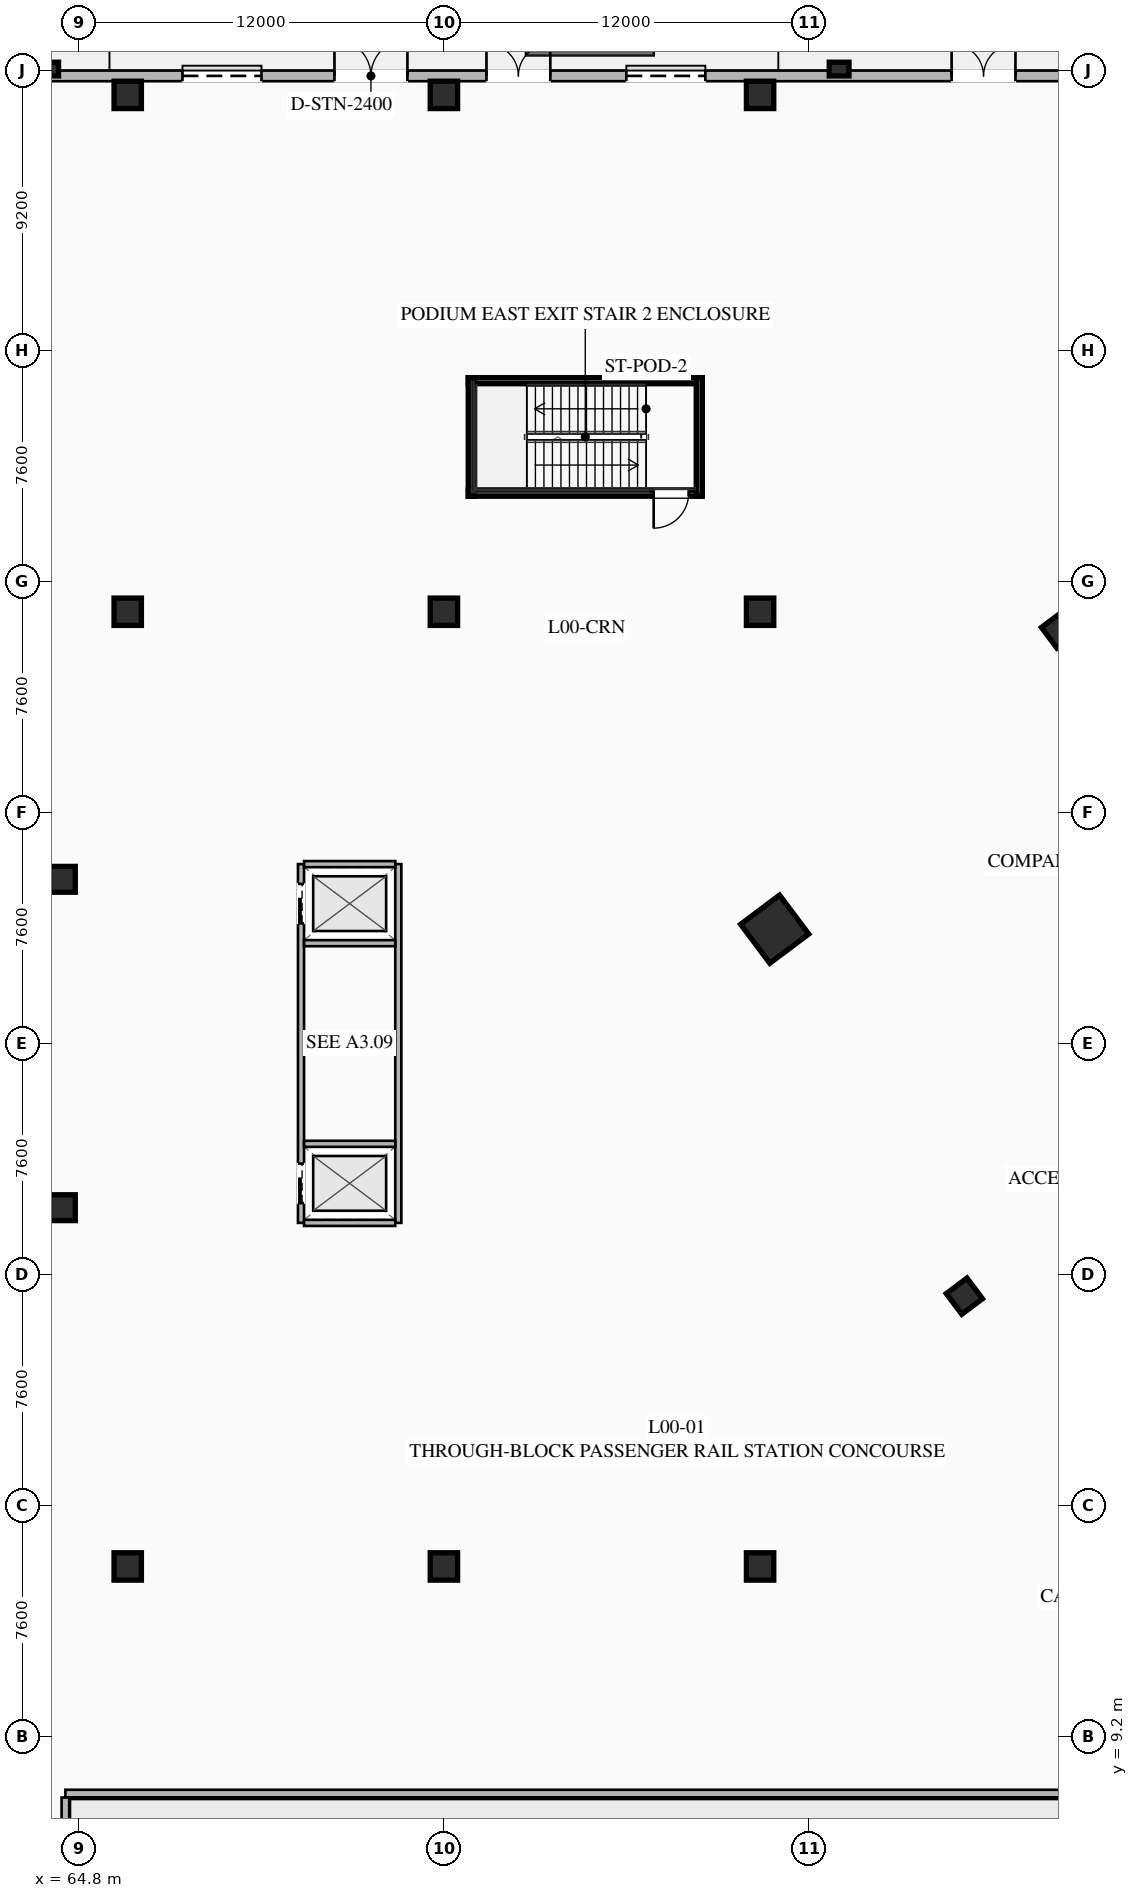
"""IFC4 building model, lengths in metres.
Left out: names, types, materials, properties, quantities, classifications, styles, units other than length and angle.
Written with IfcOpenShell. Run it as: python <this file> out.ifc"""

import sys

from ifc_helpers import new_model, si_unit, direction, frame, frame_2d, origin, origin_2d, place, context, subcontext, project, spatial, rectangle, hollow_rectangle, extrude, element, fill, save


model = new_model("IFC4")
c1 = context("Model", 3, precision=1e-05, world=origin(), true_north=direction((0.0, 1.0)))
c2 = subcontext(c1, "Body", "Model", "MODEL_VIEW")
j1 = project(units=[si_unit("LENGTHUNIT", "METRE"), si_unit("PLANEANGLEUNIT", "RADIAN")], contexts=[c1])
p1 = place(None, origin())
s1 = spatial("IfcSite", under=j1, at=p1, CompositionType="ELEMENT")
p2 = place(p1, origin())
s2 = spatial("IfcBuilding", under=s1, at=p2, CompositionType="ELEMENT")
p3 = place(p2, origin())
s3 = spatial("IfcBuildingStorey", under=s2, at=p3, CompositionType="ELEMENT", Elevation=0.0)
for number, where, z_axis, x_axis in (
    (1, (64.25, 26.6, 0.0), (0.0, 0.0, 1.0), (1.0, 0.0, 0.0)),
    (2, (64.25, 37.4, 0.0), (0.0, 0.0, 1.0), (1.0, 0.0, 0.0)),
):
    element("IfcColumn", number, at=place(p3, frame(where, z_axis=z_axis, x_axis=x_axis)), inside=s3, PredefinedType="COLUMN", context=c2, shape_type="SweptSolid", body=[
        extrude(hollow_rectangle(XDim=0.85, YDim=0.85, WallThickness=0.035, at=origin_2d()), origin(), (0.0, 0.0, 1.0), 5.14),
    ])
p4 = place(p3, frame((87.68, 35.76, 0.0), z_axis=(0.0, 0.0, 1.0), x_axis=(0.799999996291, 0.600000004945, 0.0)))
e3 = element("IfcColumn", 3, at=p4, inside=s3, PredefinedType="COLUMN", context=c2, shape_type="SweptSolid", body=[
    extrude(hollow_rectangle(XDim=1.6, YDim=1.6, WallThickness=0.06, at=origin_2d()), origin(), (0.0, 0.0, 1.0), 5.14),
])
for number, where, z_axis, x_axis in (
    (4, (97.05, 45.6, 0.0), (0.0, 0.0, 1.0), (0.8, 0.6, 0.0)),
    (5, (93.92, 23.69, 0.0), (0.0, 0.0, 1.0), (0.8, 0.6, 0.0)),
):
    element("IfcColumn", number, at=place(p3, frame(where, z_axis=z_axis, x_axis=x_axis)), inside=s3, PredefinedType="COLUMN", context=c2, shape_type="SweptSolid", body=[
        extrude(hollow_rectangle(XDim=0.85, YDim=0.85, WallThickness=0.035, at=origin_2d()), origin(), (0.0, 0.0, 1.0), 5.14),
    ])
for number, where, z_axis, x_axis in (
    (6, (66.4, 63.2, 0.0), (0.0, 0.0, 1.0), (1.0, 0.0, 0.0)),
    (7, (76.8, 63.2, 0.0), (0.0, 0.0, 1.0), (1.0, 0.0, 0.0)),
    (8, (87.2, 63.2, 0.0), (0.0, 0.0, 1.0), (1.0, 0.0, 0.0)),
    (9, (66.4, 14.8, 0.0), (0.0, 0.0, 1.0), (1.0, 0.0, 0.0)),
    (10, (66.4, 46.2, 0.0), (0.0, 0.0, 1.0), (1.0, 0.0, 0.0)),
    (11, (76.8, 14.8, 0.0), (0.0, 0.0, 1.0), (1.0, 0.0, 0.0)),
    (12, (76.8, 46.2, 0.0), (0.0, 0.0, 1.0), (1.0, 0.0, 0.0)),
    (13, (87.2, 14.8, 0.0), (0.0, 0.0, 1.0), (1.0, 0.0, 0.0)),
    (14, (87.2, 46.2, 0.0), (0.0, 0.0, 1.0), (1.0, 0.0, 0.0)),
):
    element("IfcColumn", number, at=place(p3, frame(where, z_axis=z_axis, x_axis=x_axis)), inside=s3, PredefinedType="COLUMN", context=c2, shape_type="SweptSolid", body=[
        extrude(rectangle(XDim=0.9, YDim=0.9, at=origin_2d()), origin(), (0.0, 0.0, 1.0), 5.14),
    ])
p5 = place(p3, frame((0.0, 63.825, 0.0), z_axis=(0.0, 0.0, 1.0), x_axis=(1.0, 0.0, 0.0)))
e15 = element("IfcWall", 15, at=p5, inside=s3, PredefinedType="SOLIDWALL", context=c2, shape_type="SweptSolid", body=[
    extrude(rectangle(XDim=144.0, YDim=0.35, at=frame_2d((72.0, 0.0))), origin(), (0.0, 0.0, 1.0), 5.14),
])
p6 = place(p5, frame((68.2, 0.0, 0.0)))
e16 = element("IfcOpeningElement", 16, at=p6, cuts=e15, PredefinedType="OPENING", context=c2, shape_type="SweptSolid", body=[
    extrude(rectangle(XDim=2.6, YDim=2.75, at=frame_2d((1.3, 1.375))), frame((0.0, 0.185, 0.0), z_axis=(0.0, -1.0, 0.0), x_axis=(1.0, 0.0, 0.0)), (0.0, 0.0, 1.0), 0.37),
])
p7 = place(p5, frame((82.8, 0.0, 0.0)))
e17 = element("IfcOpeningElement", 17, at=p7, cuts=e15, PredefinedType="OPENING", context=c2, shape_type="SweptSolid", body=[
    extrude(rectangle(XDim=2.6, YDim=2.75, at=frame_2d((1.3, 1.375))), frame((0.0, 0.185, 0.0), z_axis=(0.0, -1.0, 0.0), x_axis=(1.0, 0.0, 0.0)), (0.0, 0.0, 1.0), 0.37),
])
p8 = place(p5, frame((3.8, 0.0, 0.0)))
e18 = element("IfcOpeningElement", 18, at=p8, cuts=e15, PredefinedType="OPENING", context=c2, shape_type="SweptSolid", body=[
    extrude(rectangle(XDim=2.1, YDim=2.5, at=frame_2d((1.05, 1.25))), frame((0.0, 0.185, 0.0), z_axis=(0.0, -1.0, 0.0), x_axis=(1.0, 0.0, 0.0)), (0.0, 0.0, 1.0), 0.37),
])
p9 = place(p5, frame((13.2, 0.0, 0.0)))
e19 = element("IfcOpeningElement", 19, at=p9, cuts=e15, PredefinedType="OPENING", context=c2, shape_type="SweptSolid", body=[
    extrude(rectangle(XDim=2.1, YDim=2.5, at=frame_2d((1.05, 1.25))), frame((0.0, 0.185, 0.0), z_axis=(0.0, -1.0, 0.0), x_axis=(1.0, 0.0, 0.0)), (0.0, 0.0, 1.0), 0.37),
])
p10 = place(p5, frame((24.5, 0.0, 0.0)))
e20 = element("IfcOpeningElement", 20, at=p10, cuts=e15, PredefinedType="OPENING", context=c2, shape_type="SweptSolid", body=[
    extrude(rectangle(XDim=2.1, YDim=2.5, at=frame_2d((1.05, 1.25))), frame((0.0, 0.185, 0.0), z_axis=(0.0, -1.0, 0.0), x_axis=(1.0, 0.0, 0.0)), (0.0, 0.0, 1.0), 0.37),
])
p11 = place(p5, frame((73.2, 0.0, 0.0)))
e21 = element("IfcOpeningElement", 21, at=p11, cuts=e15, PredefinedType="OPENING", context=c2, shape_type="SweptSolid", body=[
    extrude(rectangle(XDim=2.4, YDim=2.7, at=frame_2d((1.2, 1.35))), frame((0.0, 0.185, 0.0), z_axis=(0.0, -1.0, 0.0), x_axis=(1.0, 0.0, 0.0)), (0.0, 0.0, 1.0), 0.37),
])
p12 = place(p5, frame((78.2, 0.0, 0.0)))
e22 = element("IfcOpeningElement", 22, at=p12, cuts=e15, PredefinedType="OPENING", context=c2, shape_type="SweptSolid", body=[
    extrude(rectangle(XDim=2.1, YDim=2.5, at=frame_2d((1.05, 1.25))), frame((0.0, 0.185, 0.0), z_axis=(0.0, -1.0, 0.0), x_axis=(1.0, 0.0, 0.0)), (0.0, 0.0, 1.0), 0.37),
])
p13 = place(p5, frame((93.5, 0.0, 0.0)))
e23 = element("IfcOpeningElement", 23, at=p13, cuts=e15, PredefinedType="OPENING", context=c2, shape_type="SweptSolid", body=[
    extrude(rectangle(XDim=2.1, YDim=2.5, at=frame_2d((1.05, 1.25))), frame((0.0, 0.185, 0.0), z_axis=(0.0, -1.0, 0.0), x_axis=(1.0, 0.0, 0.0)), (0.0, 0.0, 1.0), 0.37),
])
p14 = place(p5, frame((35.5, 0.0, 0.95)))
e24 = element("IfcOpeningElement", 24, at=p14, cuts=e15, PredefinedType="OPENING", context=c2, shape_type="SweptSolid", body=[
    extrude(rectangle(XDim=3.0, YDim=2.4, at=frame_2d((1.5, 1.2))), frame((0.0, 0.185, 0.0), z_axis=(0.0, -1.0, 0.0), x_axis=(1.0, 0.0, 0.0)), (0.0, 0.0, 1.0), 0.37),
])
p15 = place(p5, frame((41.5, 0.0, 0.95)))
e25 = element("IfcOpeningElement", 25, at=p15, cuts=e15, PredefinedType="OPENING", context=c2, shape_type="SweptSolid", body=[
    extrude(rectangle(XDim=3.0, YDim=2.4, at=frame_2d((1.5, 1.2))), frame((0.0, 0.185, 0.0), z_axis=(0.0, -1.0, 0.0), x_axis=(1.0, 0.0, 0.0)), (0.0, 0.0, 1.0), 0.37),
])
p16 = place(p5, frame((56.5, 0.0, 0.95)))
e26 = element("IfcOpeningElement", 26, at=p16, cuts=e15, PredefinedType="OPENING", context=c2, shape_type="SweptSolid", body=[
    extrude(rectangle(XDim=3.0, YDim=2.4, at=frame_2d((1.5, 1.2))), frame((0.0, 0.185, 0.0), z_axis=(0.0, -1.0, 0.0), x_axis=(1.0, 0.0, 0.0)), (0.0, 0.0, 1.0), 0.37),
])
p17 = place(p5, frame((110.5, 0.0, 0.95)))
e27 = element("IfcOpeningElement", 27, at=p17, cuts=e15, PredefinedType="OPENING", context=c2, shape_type="SweptSolid", body=[
    extrude(rectangle(XDim=3.0, YDim=2.4, at=frame_2d((1.5, 1.2))), frame((0.0, 0.185, 0.0), z_axis=(0.0, -1.0, 0.0), x_axis=(1.0, 0.0, 0.0)), (0.0, 0.0, 1.0), 0.37),
])
p18 = place(p5, frame((126.5, 0.0, 0.95)))
e28 = element("IfcOpeningElement", 28, at=p18, cuts=e15, PredefinedType="OPENING", context=c2, shape_type="SweptSolid", body=[
    extrude(rectangle(XDim=3.0, YDim=2.4, at=frame_2d((1.5, 1.2))), frame((0.0, 0.185, 0.0), z_axis=(0.0, -1.0, 0.0), x_axis=(1.0, 0.0, 0.0)), (0.0, 0.0, 1.0), 0.37),
])
for number, where, z_axis, x_axis in (
    (29, (63.8, 64.05, 0.0), (0.0, 0.0, 1.0), (1.0, 0.0, 0.0)),
    (30, (89.8, 64.05, 0.0), (0.0, 0.0, 1.0), (1.0, 0.0, 0.0)),
):
    element("IfcColumn", number, at=place(p3, frame(where, z_axis=z_axis, x_axis=x_axis)), inside=s3, PredefinedType="PILASTER", context=c2, shape_type="SweptSolid", body=[
        extrude(rectangle(XDim=0.65, YDim=0.45, at=origin_2d()), origin(), (0.0, 0.0, 1.0), 5.14),
    ])
p19 = place(p3, frame((85.3, 50.1, 0.0), z_axis=(0.0, 0.0, 1.0), x_axis=(-1.0, 0.0, 0.0)))
e31 = element("IfcWall", 31, at=p19, inside=s3, PredefinedType="SHEAR", context=c2, shape_type="SweptSolid", body=[
    extrude(rectangle(XDim=7.7, YDim=0.2, at=frame_2d((3.85, 0.0))), origin(), (0.0, 0.0, 1.0), 5.14),
])
p20 = place(p19, frame((0.45, 0.0, 0.0)))
e32 = element("IfcOpeningElement", 32, at=p20, cuts=e31, PredefinedType="OPENING", context=c2, shape_type="SweptSolid", body=[
    extrude(rectangle(XDim=1.15, YDim=2.2, at=frame_2d((0.575, 1.1))), frame((0.0, 0.11, 0.0), z_axis=(0.0, -1.0, 0.0), x_axis=(1.0, 0.0, 0.0)), (0.0, 0.0, 1.0), 0.22),
])
p21 = place(p3, frame((77.6, 53.8, 0.0), z_axis=(0.0, 0.0, 1.0), x_axis=(1.0, 0.0, 0.0)))
e33 = element("IfcWall", 33, at=p21, inside=s3, PredefinedType="SHEAR", context=c2, shape_type="SweptSolid", body=[
    extrude(rectangle(XDim=7.7, YDim=0.2, at=frame_2d((3.85, 0.0))), origin(), (0.0, 0.0, 1.0), 5.14),
])
for number, where, z_axis, x_axis in (
    (34, (77.7, 50.0, 0.0), (0.0, 0.0, 1.0), (0.0, 1.0, 0.0)),
    (35, (85.2, 50.0, 0.0), (0.0, 0.0, 1.0), (0.0, 1.0, 0.0)),
):
    element("IfcWall", number, at=place(p3, frame(where, z_axis=z_axis, x_axis=x_axis)), inside=s3, PredefinedType="SHEAR", context=c2, shape_type="SweptSolid", body=[
        extrude(rectangle(XDim=3.9, YDim=0.2, at=frame_2d((1.95, 0.0))), origin(), (0.0, 0.0, 1.0), 5.14),
    ])
p22 = place(p3, frame((72.1, 26.1, 0.0), z_axis=(0.0, 0.0, 1.0), x_axis=(0.0, 1.0, 0.0)))
e36 = element("IfcWall", 36, at=p22, inside=s3, PredefinedType="SOLIDWALL", context=c2, shape_type="SweptSolid", body=[
    extrude(rectangle(XDim=11.8, YDim=0.2, at=frame_2d((5.9, 0.0))), origin(), (0.0, 0.0, 1.0), 3.31),
])
p23 = place(p22, frame((0.65, 0.0, 0.0)))
e37 = element("IfcOpeningElement", 37, at=p23, cuts=e36, PredefinedType="OPENING", context=c2, shape_type="SweptSolid", body=[
    extrude(rectangle(XDim=1.3, YDim=2.25, at=frame_2d((0.65, 1.125))), frame((0.0, 0.11, 0.0), z_axis=(0.0, -1.0, 0.0), x_axis=(1.0, 0.0, 0.0)), (0.0, 0.0, 1.0), 0.22),
])
p24 = place(p22, frame((9.85, 0.0, 0.0)))
e38 = element("IfcOpeningElement", 38, at=p24, cuts=e36, PredefinedType="OPENING", context=c2, shape_type="SweptSolid", body=[
    extrude(rectangle(XDim=1.3, YDim=2.25, at=frame_2d((0.65, 1.125))), frame((0.0, 0.11, 0.0), z_axis=(0.0, -1.0, 0.0), x_axis=(1.0, 0.0, 0.0)), (0.0, 0.0, 1.0), 0.22),
])
p25 = place(p3, frame((75.3, 26.1, 0.0), z_axis=(0.0, 0.0, 1.0), x_axis=(0.0, 1.0, 0.0)))
e39 = element("IfcWall", 39, at=p25, inside=s3, PredefinedType="SOLIDWALL", context=c2, shape_type="SweptSolid", body=[
    extrude(rectangle(XDim=11.8, YDim=0.2, at=frame_2d((5.9, 0.0))), origin(), (0.0, 0.0, 1.0), 3.31),
])
for number, where, z_axis, x_axis in (
    (40, (72.2, 26.1, 0.0), (0.0, 0.0, 1.0), (1.0, 0.0, 0.0)),
    (41, (72.2, 28.7, 0.0), (0.0, 0.0, 1.0), (1.0, 0.0, 0.0)),
    (42, (72.2, 35.3, 0.0), (0.0, 0.0, 1.0), (1.0, 0.0, 0.0)),
    (43, (72.2, 37.9, 0.0), (0.0, 0.0, 1.0), (1.0, 0.0, 0.0)),
):
    element("IfcWall", number, at=place(p3, frame(where, z_axis=z_axis, x_axis=x_axis)), inside=s3, PredefinedType="SOLIDWALL", context=c2, shape_type="SweptSolid", body=[
        extrude(rectangle(XDim=3.0, YDim=0.2, at=frame_2d((1.5, 0.0))), origin(), (0.0, 0.0, 1.0), 3.31),
    ])
p26 = place(p3, frame((64.35, 7.33, 0.0), z_axis=(0.0, 0.0, 1.0), x_axis=(1.0, 0.0, 0.0)))
e44 = element("IfcWall", 44, at=p26, inside=s3, PredefinedType="SOLIDWALL", context=c2, shape_type="SweptSolid", body=[
    extrude(rectangle(XDim=41.25, YDim=0.25, at=frame_2d((20.625, 0.0))), origin(), (0.0, 0.0, 1.0), 5.14),
])
p27 = place(p3, frame((64.35, 0.35, 0.0), z_axis=(0.0, 0.0, 1.0), x_axis=(0.0, 1.0, 0.0)))
e45 = element("IfcWall", 45, at=p27, inside=s3, PredefinedType="SOLIDWALL", context=c2, shape_type="SweptSolid", body=[
    extrude(rectangle(XDim=6.85, YDim=0.25, at=frame_2d((3.425, 0.0))), origin(), (0.0, 0.0, 1.0), 5.14),
])
p28 = place(p6, origin())
e46 = element("IfcDoor", 46, at=p28, inside=s3, OperationType="ROLLINGUP", PredefinedType="GATE", context=c2, shape_type="SweptSolid", body=[
    extrude(rectangle(XDim=2.6, YDim=2.75, at=frame_2d((1.3, 1.375))), frame((0.0, 0.025, 0.0), z_axis=(0.0, -1.0, 0.0), x_axis=(1.0, 0.0, 0.0)), (0.0, 0.0, 1.0), 0.05),
])
fill(e16, e46)
p29 = place(p7, origin())
e47 = element("IfcDoor", 47, at=p29, inside=s3, OperationType="ROLLINGUP", PredefinedType="GATE", context=c2, shape_type="SweptSolid", body=[
    extrude(rectangle(XDim=2.6, YDim=2.75, at=frame_2d((1.3, 1.375))), frame((0.0, 0.025, 0.0), z_axis=(0.0, -1.0, 0.0), x_axis=(1.0, 0.0, 0.0)), (0.0, 0.0, 1.0), 0.05),
])
fill(e17, e47)
p30 = place(p11, origin())
e48 = element("IfcDoor", 48, at=p30, inside=s3, OperationType="DOUBLE_DOOR_SINGLE_SWING", PredefinedType="DOOR", context=c2, shape_type="SweptSolid", body=[
    extrude(rectangle(XDim=2.4, YDim=2.7, at=frame_2d((1.2, 1.35))), frame((0.0, 0.025, 0.0), z_axis=(0.0, -1.0, 0.0), x_axis=(1.0, 0.0, 0.0)), (0.0, 0.0, 1.0), 0.05),
])
fill(e21, e48)
p31 = place(p12, origin())
e49 = element("IfcDoor", 49, at=p31, inside=s3, OperationType="DOUBLE_DOOR_SINGLE_SWING", PredefinedType="DOOR", context=c2, shape_type="SweptSolid", body=[
    extrude(rectangle(XDim=2.1, YDim=2.5, at=frame_2d((1.05, 1.25))), frame((0.0, 0.025, 0.0), z_axis=(0.0, -1.0, 0.0), x_axis=(1.0, 0.0, 0.0)), (0.0, 0.0, 1.0), 0.05),
])
fill(e22, e49)
p32 = place(p13, origin())
e50 = element("IfcDoor", 50, at=p32, inside=s3, OperationType="DOUBLE_DOOR_SINGLE_SWING", PredefinedType="DOOR", context=c2, shape_type="SweptSolid", body=[
    extrude(rectangle(XDim=2.1, YDim=2.5, at=frame_2d((1.05, 1.25))), frame((0.0, 0.025, 0.0), z_axis=(0.0, -1.0, 0.0), x_axis=(1.0, 0.0, 0.0)), (0.0, 0.0, 1.0), 0.05),
])
fill(e23, e50)
p33 = place(p20, origin())
e51 = element("IfcDoor", 51, at=p33, inside=s3, OperationType="SINGLE_SWING_RIGHT", PredefinedType="DOOR", context=c2, shape_type="SweptSolid", body=[
    extrude(rectangle(XDim=1.15, YDim=2.2, at=frame_2d((0.575, 1.1))), frame((0.0, 0.025, 0.0), z_axis=(0.0, -1.0, 0.0), x_axis=(1.0, 0.0, 0.0)), (0.0, 0.0, 1.0), 0.05),
])
fill(e32, e51)
p34 = place(p23, origin())
e52 = element("IfcDoor", 52, at=p34, inside=s3, OperationType="SLIDING_TO_LEFT", PredefinedType="DOOR", context=c2, shape_type="SweptSolid", body=[
    extrude(rectangle(XDim=1.3, YDim=2.25, at=frame_2d((0.65, 1.125))), frame((0.0, 0.025, 0.0), z_axis=(0.0, -1.0, 0.0), x_axis=(1.0, 0.0, 0.0)), (0.0, 0.0, 1.0), 0.05),
])
fill(e37, e52)
p35 = place(p24, origin())
e53 = element("IfcDoor", 53, at=p35, inside=s3, OperationType="SLIDING_TO_LEFT", PredefinedType="DOOR", context=c2, shape_type="SweptSolid", body=[
    extrude(rectangle(XDim=1.3, YDim=2.25, at=frame_2d((0.65, 1.125))), frame((0.0, 0.025, 0.0), z_axis=(0.0, -1.0, 0.0), x_axis=(1.0, 0.0, 0.0)), (0.0, 0.0, 1.0), 0.05),
])
fill(e38, e53)
save(model, sys.argv[1])
